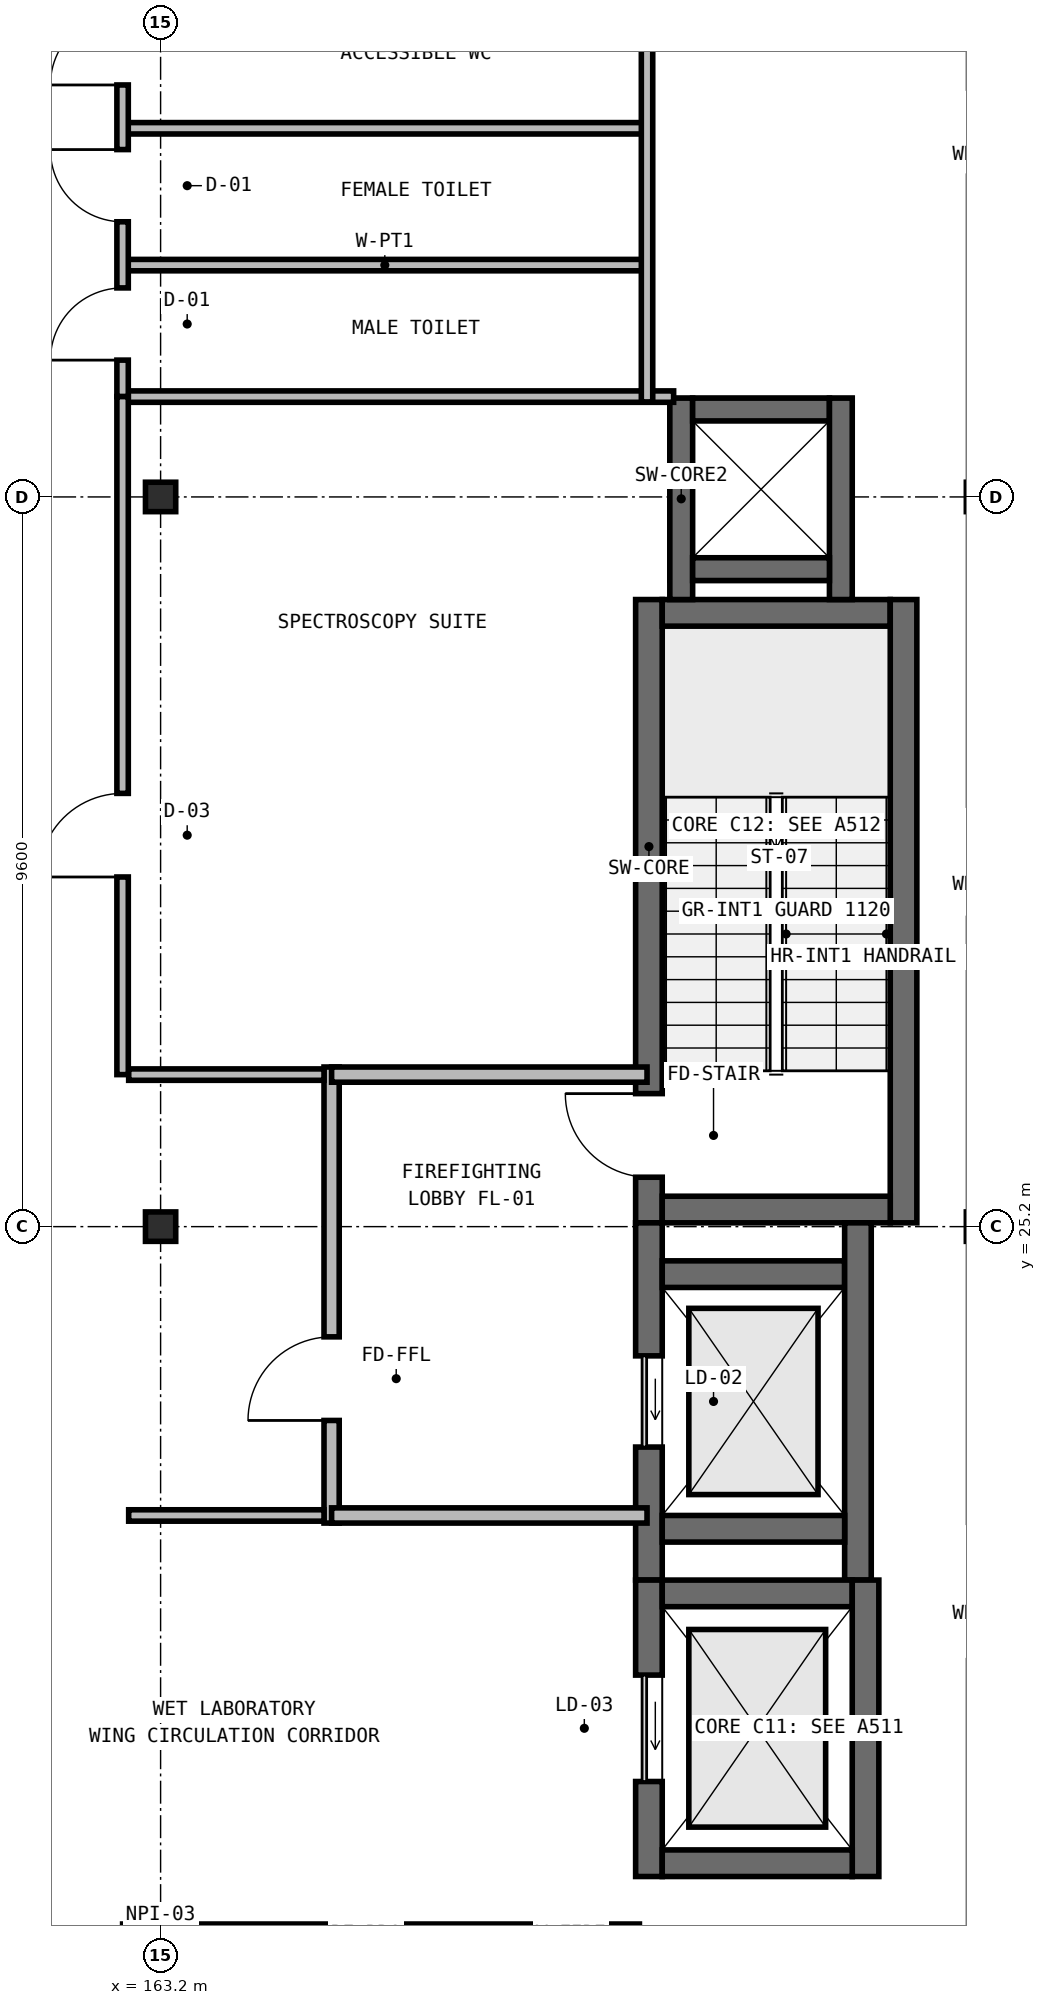
"""IFC4 building model, lengths in metres.
Left out: names, types, materials, properties, quantities, classifications, styles, units other than length and angle.
Written with IfcOpenShell. Run it as: python <this file> out.ifc"""

import sys

from ifc_helpers import new_model, si_unit, direction, frame, frame_2d, origin, origin_2d, place, context, subcontext, project, spatial, rectangle, i_section, extrude, element, fill, save


model = new_model("IFC4")
c1 = context("Model", 3, precision=1e-05, world=origin(), true_north=direction((0.0, 1.0)))
c2 = subcontext(c1, "Body", "Model", "MODEL_VIEW")
j1 = project(units=[si_unit("LENGTHUNIT", "METRE"), si_unit("PLANEANGLEUNIT", "RADIAN")], contexts=[c1])
p1 = place(None, origin())
s1 = spatial("IfcSite", under=j1, at=p1, CompositionType="ELEMENT")
p2 = place(p1, origin())
s2 = spatial("IfcBuilding", under=s1, at=p2, CompositionType="ELEMENT")
p3 = place(p2, frame((0.0, 0.0, 5.25)))
s3 = spatial("IfcBuildingStorey", under=s2, at=p3, CompositionType="ELEMENT", Elevation=5.25)
p4 = place(p3, frame((169.625, 25.25, 0.0), z_axis=(0.0, 0.0, 1.0), x_axis=(0.0, 1.0, 0.0)))
e1 = element("IfcWall", 1, at=p4, inside=s3, PredefinedType="SHEAR", context=c2, shape_type="SweptSolid", body=[
    extrude(rectangle(XDim=8.2, YDim=0.35, at=frame_2d((4.1, 0.0))), origin(), (0.0, 0.0, 1.0), 4.55),
])
p5 = place(p4, frame((0.6, 0.0, 0.0)))
e2 = element("IfcOpeningElement", 2, at=p5, cuts=e1, PredefinedType="OPENING", context=c2, shape_type="SweptSolid", body=[
    extrude(rectangle(XDim=1.1, YDim=2.15, at=frame_2d((0.55, 1.075))), frame((0.0, 0.185, 0.0), z_axis=(0.0, -1.0, 0.0), x_axis=(1.0, 0.0, 0.0)), (0.0, 0.0, 1.0), 0.37),
])
p6 = place(p3, frame((169.8, 33.275, 0.0), z_axis=(0.0, 0.0, 1.0), x_axis=(1.0, 0.0, 0.0)))
e3 = element("IfcWall", 3, at=p6, inside=s3, PredefinedType="SHEAR", context=c2, shape_type="SweptSolid", body=[
    extrude(rectangle(XDim=3.0, YDim=0.35, at=frame_2d((1.5, 0.0))), origin(), (0.0, 0.0, 1.0), 4.55),
])
p7 = place(p3, frame((172.975, 33.45, 0.0), z_axis=(0.0, 0.0, 1.0), x_axis=(0.0, -1.0, 0.0)))
e4 = element("IfcWall", 4, at=p7, inside=s3, PredefinedType="SHEAR", context=c2, shape_type="SweptSolid", body=[
    extrude(rectangle(XDim=8.2, YDim=0.35, at=frame_2d((4.1, 0.0))), origin(), (0.0, 0.0, 1.0), 4.55),
])
p8 = place(p3, frame((172.8, 25.425, 0.0), z_axis=(0.0, 0.0, 1.0), x_axis=(-1.0, 0.0, 0.0)))
e5 = element("IfcWall", 5, at=p8, inside=s3, PredefinedType="SHEAR", context=c2, shape_type="SweptSolid", body=[
    extrude(rectangle(XDim=3.0, YDim=0.35, at=frame_2d((1.5, 0.0))), origin(), (0.0, 0.0, 1.0), 4.55),
])
p9 = place(p3, frame((169.625, 20.55, 0.0), z_axis=(0.0, 0.0, 1.0), x_axis=(0.0, 1.0, 0.0)))
e6 = element("IfcWall", 6, at=p9, inside=s3, PredefinedType="SHEAR", context=c2, shape_type="SweptSolid", body=[
    extrude(rectangle(XDim=4.7, YDim=0.35, at=frame_2d((2.35, 0.0))), origin(), (0.0, 0.0, 1.0), 4.55),
])
p10 = place(p9, frame((1.75, 0.0, 0.0)))
e7 = element("IfcOpeningElement", 7, at=p10, cuts=e6, PredefinedType="OPENING", context=c2, shape_type="SweptSolid", body=[
    extrude(rectangle(XDim=1.2, YDim=2.15, at=frame_2d((0.6, 1.075))), frame((0.0, 0.185, 0.0), z_axis=(0.0, -1.0, 0.0), x_axis=(1.0, 0.0, 0.0)), (0.0, 0.0, 1.0), 0.37),
])
p11 = place(p3, frame((169.8, 24.575, 0.0), z_axis=(0.0, 0.0, 1.0), x_axis=(1.0, 0.0, 0.0)))
e8 = element("IfcWall", 8, at=p11, inside=s3, PredefinedType="SHEAR", context=c2, shape_type="SweptSolid", body=[
    extrude(rectangle(XDim=2.4, YDim=0.35, at=frame_2d((1.2, 0.0))), origin(), (0.0, 0.0, 1.0), 4.55),
])
p12 = place(p3, frame((172.375, 25.25, 0.0), z_axis=(0.0, 0.0, 1.0), x_axis=(0.0, -1.0, 0.0)))
e9 = element("IfcWall", 9, at=p12, inside=s3, PredefinedType="SHEAR", context=c2, shape_type="SweptSolid", body=[
    extrude(rectangle(XDim=4.7, YDim=0.35, at=frame_2d((2.35, 0.0))), origin(), (0.0, 0.0, 1.0), 4.55),
])
p13 = place(p3, frame((172.2, 21.225, 0.0), z_axis=(0.0, 0.0, 1.0), x_axis=(-1.0, 0.0, 0.0)))
e10 = element("IfcWall", 10, at=p13, inside=s3, PredefinedType="SHEAR", context=c2, shape_type="SweptSolid", body=[
    extrude(rectangle(XDim=2.4, YDim=0.35, at=frame_2d((1.2, 0.0))), origin(), (0.0, 0.0, 1.0), 4.55),
])
p14 = place(p3, frame((169.625, 16.65, 0.0), z_axis=(0.0, 0.0, 1.0), x_axis=(0.0, 1.0, 0.0)))
e11 = element("IfcWall", 11, at=p14, inside=s3, PredefinedType="SHEAR", context=c2, shape_type="SweptSolid", body=[
    extrude(rectangle(XDim=3.9, YDim=0.35, at=frame_2d((1.95, 0.0))), origin(), (0.0, 0.0, 1.0), 4.55),
])
p15 = place(p14, frame((1.25, 0.0, 0.0)))
e12 = element("IfcOpeningElement", 12, at=p15, cuts=e11, PredefinedType="OPENING", context=c2, shape_type="SweptSolid", body=[
    extrude(rectangle(XDim=1.4, YDim=2.3, at=frame_2d((0.7, 1.15))), frame((0.0, 0.185, 0.0), z_axis=(0.0, -1.0, 0.0), x_axis=(1.0, 0.0, 0.0)), (0.0, 0.0, 1.0), 0.37),
])
p16 = place(p3, frame((169.8, 20.375, 0.0), z_axis=(0.0, 0.0, 1.0), x_axis=(1.0, 0.0, 0.0)))
e13 = element("IfcWall", 13, at=p16, inside=s3, PredefinedType="SHEAR", context=c2, shape_type="SweptSolid", body=[
    extrude(rectangle(XDim=2.5, YDim=0.35, at=frame_2d((1.25, 0.0))), origin(), (0.0, 0.0, 1.0), 4.55),
])
p17 = place(p3, frame((172.475, 20.55, 0.0), z_axis=(0.0, 0.0, 1.0), x_axis=(0.0, -1.0, 0.0)))
e14 = element("IfcWall", 14, at=p17, inside=s3, PredefinedType="SHEAR", context=c2, shape_type="SweptSolid", body=[
    extrude(rectangle(XDim=3.9, YDim=0.35, at=frame_2d((1.95, 0.0))), origin(), (0.0, 0.0, 1.0), 4.55),
])
p18 = place(p3, frame((172.3, 16.825, 0.0), z_axis=(0.0, 0.0, 1.0), x_axis=(-1.0, 0.0, 0.0)))
e15 = element("IfcWall", 15, at=p18, inside=s3, PredefinedType="SHEAR", context=c2, shape_type="SweptSolid", body=[
    extrude(rectangle(XDim=2.5, YDim=0.35, at=frame_2d((1.25, 0.0))), origin(), (0.0, 0.0, 1.0), 4.55),
])
for number, where, z_axis, x_axis in (
    (16, (163.2, 25.2, 0.0), (0.0, 0.0, 1.0), (1.0, 0.0, 0.0)),
    (17, (163.2, 34.8, 0.0), (0.0, 0.0, 1.0), (1.0, 0.0, 0.0)),
):
    element("IfcColumn", number, at=place(p3, frame(where, z_axis=z_axis, x_axis=x_axis)), inside=s3, PredefinedType="COLUMN", context=c2, shape_type="SweptSolid", body=[
        extrude(i_section(OverallWidth=0.398, OverallDepth=0.387, WebThickness=0.024, FlangeThickness=0.039, at=origin_2d()), origin(), (0.0, 0.0, 1.0), 4.55),
    ])
p19 = place(p3, frame((170.05, 33.45, 0.0), z_axis=(0.0, 0.0, 1.0), x_axis=(0.0, 1.0, 0.0)))
e18 = element("IfcWall", 18, at=p19, inside=s3, PredefinedType="SHEAR", context=c2, shape_type="SweptSolid", body=[
    extrude(rectangle(XDim=2.65, YDim=0.3, at=frame_2d((1.325, 0.0))), origin(), (0.0, 0.0, 1.0), 4.37),
])
p20 = place(p3, frame((170.2, 35.95, 0.0), z_axis=(0.0, 0.0, 1.0), x_axis=(1.0, 0.0, 0.0)))
e19 = element("IfcWall", 19, at=p20, inside=s3, PredefinedType="SHEAR", context=c2, shape_type="SweptSolid", body=[
    extrude(rectangle(XDim=1.8, YDim=0.3, at=frame_2d((0.9, 0.0))), origin(), (0.0, 0.0, 1.0), 4.37),
])
p21 = place(p3, frame((172.15, 36.1, 0.0), z_axis=(0.0, 0.0, 1.0), x_axis=(0.0, -1.0, 0.0)))
e20 = element("IfcWall", 20, at=p21, inside=s3, PredefinedType="SHEAR", context=c2, shape_type="SweptSolid", body=[
    extrude(rectangle(XDim=2.65, YDim=0.3, at=frame_2d((1.325, 0.0))), origin(), (0.0, 0.0, 1.0), 4.37),
])
p22 = place(p3, frame((172.0, 33.85, 0.0), z_axis=(0.0, 0.0, 1.0), x_axis=(-1.0, 0.0, 0.0)))
e21 = element("IfcWall", 21, at=p22, inside=s3, PredefinedType="SHEAR", context=c2, shape_type="SweptSolid", body=[
    extrude(rectangle(XDim=1.8, YDim=0.3, at=frame_2d((0.9, 0.0))), origin(), (0.0, 0.0, 1.0), 4.37),
])
p23 = place(p3, frame((165.45, 21.3, 0.0), z_axis=(0.0, 0.0, 1.0), x_axis=(0.0, 1.0, 0.0)))
e22 = element("IfcWall", 22, at=p23, inside=s3, PredefinedType="SOLIDWALL", context=c2, shape_type="SweptSolid", body=[
    extrude(rectangle(XDim=6.0, YDim=0.2, at=frame_2d((3.0, 0.0))), origin(), (0.0, 0.0, 1.0), 4.23),
])
p24 = place(p23, frame((1.35, 0.0, 0.0)))
e23 = element("IfcOpeningElement", 23, at=p24, cuts=e22, PredefinedType="OPENING", context=c2, shape_type="SweptSolid", body=[
    extrude(rectangle(XDim=1.1, YDim=2.15, at=frame_2d((0.55, 1.075))), frame((0.0, 0.11, 0.0), z_axis=(0.0, -1.0, 0.0), x_axis=(1.0, 0.0, 0.0)), (0.0, 0.0, 1.0), 0.22),
])
for number, where, z_axis, x_axis in (
    (24, (165.45, 21.4, 0.0), (0.0, 0.0, 1.0), (1.0, 0.0, 0.0)),
    (25, (165.45, 27.2, 0.0), (0.0, 0.0, 1.0), (1.0, 0.0, 0.0)),
):
    element("IfcWall", number, at=place(p3, frame(where, z_axis=z_axis, x_axis=x_axis)), inside=s3, PredefinedType="SOLIDWALL", context=c2, shape_type="SweptSolid", body=[
        extrude(rectangle(XDim=4.15, YDim=0.2, at=frame_2d((2.075, 0.0))), origin(), (0.0, 0.0, 1.0), 4.23),
    ])
for number, where, z_axis, x_axis in (
    (26, (162.7, 37.85, 0.0), (0.0, 0.0, 1.0), (1.0, 0.0, 0.0)),
    (27, (162.7, 39.65, 0.0), (0.0, 0.0, 1.0), (1.0, 0.0, 0.0)),
):
    element("IfcWall", number, at=place(p3, frame(where, z_axis=z_axis, x_axis=x_axis)), inside=s3, PredefinedType="PARTITIONING", context=c2, shape_type="SweptSolid", body=[
        extrude(rectangle(XDim=6.9, YDim=0.15, at=frame_2d((3.45, 0.0))), origin(), (0.0, 0.0, 1.0), 4.23),
    ])
p25 = place(p3, frame((162.7, 36.12, 0.0), z_axis=(0.0, 0.0, 1.0), x_axis=(1.0, 0.0, 0.0)))
e28 = element("IfcWall", 28, at=p25, inside=s3, PredefinedType="PARTITIONING", context=c2, shape_type="SweptSolid", body=[
    extrude(rectangle(XDim=7.25, YDim=0.15, at=frame_2d((3.625, 0.0))), origin(), (0.0, 0.0, 1.0), 4.23),
])
p26 = place(p3, frame((169.6, 36.05, 0.0), z_axis=(0.0, 0.0, 1.0), x_axis=(0.0, 1.0, 0.0)))
e29 = element("IfcWall", 29, at=p26, inside=s3, PredefinedType="PARTITIONING", context=c2, shape_type="SweptSolid", body=[
    extrude(rectangle(XDim=5.5, YDim=0.15, at=frame_2d((2.75, 0.0))), origin(), (0.0, 0.0, 1.0), 4.23),
])
p27 = place(p3, frame((162.7, 36.12, 0.0), z_axis=(0.0, 0.0, 1.0), x_axis=(0.0, 1.0, 0.0)))
e30 = element("IfcWall", 30, at=p27, inside=s3, PredefinedType="PARTITIONING", context=c2, shape_type="SweptSolid", body=[
    extrude(rectangle(XDim=5.4, YDim=0.15, at=frame_2d((2.7, 0.0))), origin(), (0.0, 0.0, 1.0), 4.23),
])
p28 = place(p27, frame((0.48, 0.0, 0.0)))
e31 = element("IfcOpeningElement", 31, at=p28, cuts=e30, PredefinedType="OPENING", context=c2, shape_type="SweptSolid", body=[
    extrude(rectangle(XDim=0.95, YDim=2.1, at=frame_2d((0.475, 1.05))), frame((0.0, 0.085, 0.0), z_axis=(0.0, -1.0, 0.0), x_axis=(1.0, 0.0, 0.0)), (0.0, 0.0, 1.0), 0.17),
])
p29 = place(p27, frame((2.3, 0.0, 0.0)))
e32 = element("IfcOpeningElement", 32, at=p29, cuts=e30, PredefinedType="OPENING", context=c2, shape_type="SweptSolid", body=[
    extrude(rectangle(XDim=0.95, YDim=2.1, at=frame_2d((0.475, 1.05))), frame((0.0, 0.085, 0.0), z_axis=(0.0, -1.0, 0.0), x_axis=(1.0, 0.0, 0.0)), (0.0, 0.0, 1.0), 0.17),
])
p30 = place(p27, frame((4.1, 0.0, 0.0)))
e33 = element("IfcOpeningElement", 33, at=p30, cuts=e30, PredefinedType="OPENING", context=c2, shape_type="SweptSolid", body=[
    extrude(rectangle(XDim=0.95, YDim=2.1, at=frame_2d((0.475, 1.05))), frame((0.0, 0.085, 0.0), z_axis=(0.0, -1.0, 0.0), x_axis=(1.0, 0.0, 0.0)), (0.0, 0.0, 1.0), 0.17),
])
p31 = place(p3, frame((162.78, 27.2, 0.0), z_axis=(0.0, 0.0, 1.0), x_axis=(1.0, 0.0, 0.0)))
e34 = element("IfcWall", 34, at=p31, inside=s3, PredefinedType="PARTITIONING", context=c2, shape_type="SweptSolid", body=[
    extrude(rectangle(XDim=2.57, YDim=0.15, at=frame_2d((1.285, 0.0))), origin(), (0.0, 0.0, 1.0), 4.23),
])
p32 = place(p3, frame((162.7, 27.2, 0.0), z_axis=(0.0, 0.0, 1.0), x_axis=(0.0, 1.0, 0.0)))
e35 = element("IfcWall", 35, at=p32, inside=s3, PredefinedType="PARTITIONING", context=c2, shape_type="SweptSolid", body=[
    extrude(rectangle(XDim=8.92, YDim=0.15, at=frame_2d((4.46, 0.0))), origin(), (0.0, 0.0, 1.0), 4.23),
])
p33 = place(p32, frame((2.6, 0.0, 0.0)))
e36 = element("IfcOpeningElement", 36, at=p33, cuts=e35, PredefinedType="OPENING", context=c2, shape_type="SweptSolid", body=[
    extrude(rectangle(XDim=1.1, YDim=2.2, at=frame_2d((0.55, 1.1))), frame((0.0, 0.085, 0.0), z_axis=(0.0, -1.0, 0.0), x_axis=(1.0, 0.0, 0.0)), (0.0, 0.0, 1.0), 0.17),
])
p34 = place(p3, frame((162.78, 21.4, 0.0), z_axis=(0.0, 0.0, 1.0), x_axis=(1.0, 0.0, 0.0)))
e37 = element("IfcWall", 37, at=p34, inside=s3, PredefinedType="PARTITIONING", context=c2, shape_type="SweptSolid", body=[
    extrude(rectangle(XDim=2.57, YDim=0.15, at=frame_2d((1.285, 0.0))), origin(), (0.0, 0.0, 1.0), 4.23),
])
p35 = place(p3, frame((162.7, 15.95, 0.0), z_axis=(0.0, 0.0, 1.0), x_axis=(1.0, 0.0, 0.0)))
e38 = element("IfcWall", 38, at=p35, inside=s3, PredefinedType="PARTITIONING", context=c2, shape_type="SweptSolid", body=[
    extrude(rectangle(XDim=6.8, YDim=0.15, at=frame_2d((3.4, 0.0))), origin(), (0.0, 0.0, 1.0), 4.23),
])
p36 = place(p5, origin())
e39 = element("IfcDoor", 39, at=p36, inside=s3, OperationType="SINGLE_SWING_RIGHT", PredefinedType="DOOR", context=c2, shape_type="SweptSolid", body=[
    extrude(rectangle(XDim=1.1, YDim=2.15, at=frame_2d((0.55, 1.075))), frame((0.0, 0.025, 0.0), z_axis=(0.0, -1.0, 0.0), x_axis=(1.0, 0.0, 0.0)), (0.0, 0.0, 1.0), 0.05),
])
fill(e2, e39)
p37 = place(p10, origin())
e40 = element("IfcDoor", 40, at=p37, inside=s3, OperationType="SLIDING_TO_LEFT", PredefinedType="USERDEFINED", context=c2, shape_type="SweptSolid", body=[
    extrude(rectangle(XDim=1.2, YDim=2.15, at=frame_2d((0.6, 1.075))), frame((0.0, 0.025, 0.0), z_axis=(0.0, -1.0, 0.0), x_axis=(1.0, 0.0, 0.0)), (0.0, 0.0, 1.0), 0.05),
])
fill(e7, e40)
p38 = place(p15, origin())
e41 = element("IfcDoor", 41, at=p38, inside=s3, OperationType="SLIDING_TO_LEFT", PredefinedType="USERDEFINED", context=c2, shape_type="SweptSolid", body=[
    extrude(rectangle(XDim=1.4, YDim=2.3, at=frame_2d((0.7, 1.15))), frame((0.0, 0.025, 0.0), z_axis=(0.0, -1.0, 0.0), x_axis=(1.0, 0.0, 0.0)), (0.0, 0.0, 1.0), 0.05),
])
fill(e12, e41)
p39 = place(p24, origin())
e42 = element("IfcDoor", 42, at=p39, inside=s3, OperationType="SINGLE_SWING_LEFT", PredefinedType="DOOR", context=c2, shape_type="SweptSolid", body=[
    extrude(rectangle(XDim=1.1, YDim=2.15, at=frame_2d((0.55, 1.075))), frame((0.0, 0.025, 0.0), z_axis=(0.0, -1.0, 0.0), x_axis=(1.0, 0.0, 0.0)), (0.0, 0.0, 1.0), 0.05),
])
fill(e23, e42)
p40 = place(p28, origin())
e43 = element("IfcDoor", 43, at=p40, inside=s3, OperationType="SINGLE_SWING_LEFT", PredefinedType="DOOR", context=c2, shape_type="SweptSolid", body=[
    extrude(rectangle(XDim=0.95, YDim=2.1, at=frame_2d((0.475, 1.05))), frame((0.0, 0.025, 0.0), z_axis=(0.0, -1.0, 0.0), x_axis=(1.0, 0.0, 0.0)), (0.0, 0.0, 1.0), 0.05),
])
fill(e31, e43)
p41 = place(p29, origin())
e44 = element("IfcDoor", 44, at=p41, inside=s3, OperationType="SINGLE_SWING_RIGHT", PredefinedType="DOOR", context=c2, shape_type="SweptSolid", body=[
    extrude(rectangle(XDim=0.95, YDim=2.1, at=frame_2d((0.475, 1.05))), frame((0.0, 0.025, 0.0), z_axis=(0.0, -1.0, 0.0), x_axis=(1.0, 0.0, 0.0)), (0.0, 0.0, 1.0), 0.05),
])
fill(e32, e44)
p42 = place(p30, origin())
e45 = element("IfcDoor", 45, at=p42, inside=s3, OperationType="SINGLE_SWING_LEFT", PredefinedType="DOOR", context=c2, shape_type="SweptSolid", body=[
    extrude(rectangle(XDim=0.95, YDim=2.1, at=frame_2d((0.475, 1.05))), frame((0.0, 0.025, 0.0), z_axis=(0.0, -1.0, 0.0), x_axis=(1.0, 0.0, 0.0)), (0.0, 0.0, 1.0), 0.05),
])
fill(e33, e45)
p43 = place(p33, origin())
e46 = element("IfcDoor", 46, at=p43, inside=s3, OperationType="SINGLE_SWING_LEFT", PredefinedType="DOOR", context=c2, shape_type="SweptSolid", body=[
    extrude(rectangle(XDim=1.1, YDim=2.2, at=frame_2d((0.55, 1.1))), frame((0.0, 0.025, 0.0), z_axis=(0.0, -1.0, 0.0), x_axis=(1.0, 0.0, 0.0)), (0.0, 0.0, 1.0), 0.05),
])
fill(e36, e46)
save(model, sys.argv[1])
